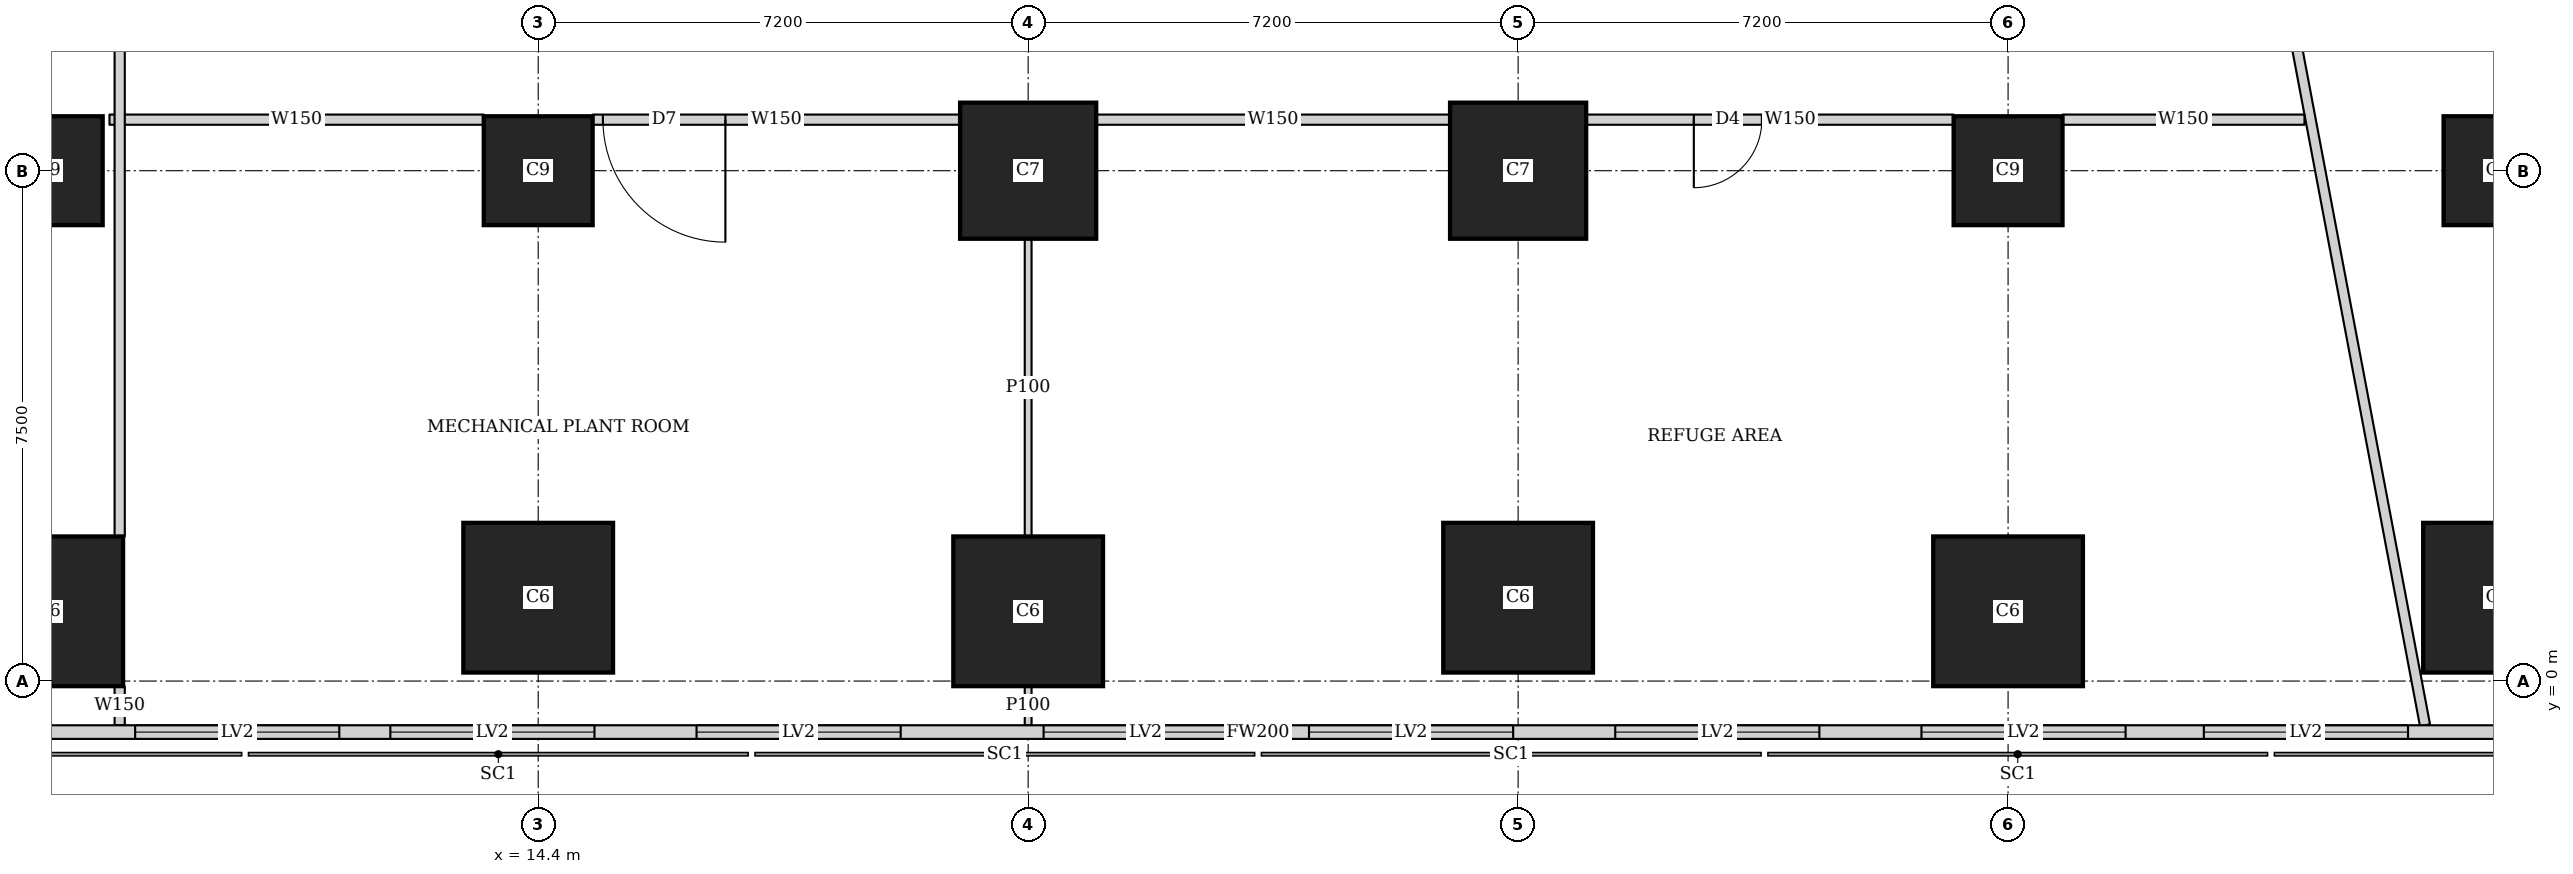
"""IFC4 building model, lengths in metres.
Left out: names, types, materials, properties, quantities, classifications, styles, units other than length and angle.
Written with IfcOpenShell. Run it as: python <this file> out.ifc"""

import sys

from ifc_helpers import new_model, si_unit, direction, frame, frame_2d, origin, origin_2d, place, context, subcontext, project, spatial, rectangle, extrude, element, fill, save


model = new_model("IFC4")
c1 = context("Model", 3, precision=1e-05, world=origin(), true_north=direction((0.0, 1.0)))
c2 = subcontext(c1, "Body", "Model", "MODEL_VIEW")
j1 = project(units=[si_unit("LENGTHUNIT", "METRE"), si_unit("PLANEANGLEUNIT", "RADIAN")], contexts=[c1])
p1 = place(None, origin())
s1 = spatial("IfcSite", under=j1, at=p1, CompositionType="ELEMENT")
p2 = place(p1, origin())
s2 = spatial("IfcBuilding", under=s1, at=p2, CompositionType="ELEMENT")
p3 = place(p2, frame((0.0, 0.0, 130.4)))
s3 = spatial("IfcBuildingStorey", under=s2, at=p3, CompositionType="ELEMENT", Elevation=130.4)
for number, where, z_axis, x_axis in (
    (1, (7.2, 1.025, 0.0), (0.0, 0.0, 1.0), (1.0, 0.0, 0.0)),
    (2, (14.4, 1.225, 0.0), (0.0, 0.0, 1.0), (1.0, 0.0, 0.0)),
    (3, (21.6, 1.025, 0.0), (0.0, 0.0, 1.0), (1.0, 0.0, 0.0)),
    (4, (28.8, 1.225, 0.0), (0.0, 0.0, 1.0), (1.0, 0.0, 0.0)),
    (5, (36.0, 1.025, 0.0), (0.0, 0.0, 1.0), (1.0, 0.0, 0.0)),
    (6, (43.2, 1.225, 0.0), (0.0, 0.0, 1.0), (1.0, 0.0, 0.0)),
):
    element("IfcColumn", number, at=place(p3, frame(where, z_axis=z_axis, x_axis=x_axis)), inside=s3, PredefinedType="COLUMN", context=c2, shape_type="SweptSolid", body=[
        extrude(rectangle(XDim=2.2, YDim=2.2, at=origin_2d()), origin(), (0.0, 0.0, 1.0), 5.4),
    ])
for number, where, z_axis, x_axis in (
    (7, (7.2, 7.5, 0.0), (0.0, 0.0, 1.0), (1.0, 0.0, 0.0)),
    (8, (14.4, 7.5, 0.0), (0.0, 0.0, 1.0), (1.0, 0.0, 0.0)),
):
    element("IfcColumn", number, at=place(p3, frame(where, z_axis=z_axis, x_axis=x_axis)), inside=s3, PredefinedType="COLUMN", context=c2, shape_type="SweptSolid", body=[
        extrude(rectangle(XDim=1.6, YDim=1.6, at=origin_2d()), origin(), (0.0, 0.0, 1.0), 5.4),
    ])
for number, where, z_axis, x_axis in (
    (9, (21.6, 7.5, 0.0), (0.0, 0.0, 1.0), (1.0, 0.0, 0.0)),
    (10, (28.8, 7.5, 0.0), (0.0, 0.0, 1.0), (1.0, 0.0, 0.0)),
):
    element("IfcColumn", number, at=place(p3, frame(where, z_axis=z_axis, x_axis=x_axis)), inside=s3, PredefinedType="COLUMN", context=c2, shape_type="SweptSolid", body=[
        extrude(rectangle(XDim=2.0, YDim=2.0, at=origin_2d()), origin(), (0.0, 0.0, 1.0), 5.4),
    ])
for number, where, z_axis, x_axis in (
    (11, (36.0, 7.5, 0.0), (0.0, 0.0, 1.0), (1.0, 0.0, 0.0)),
    (12, (43.2, 7.5, 0.0), (0.0, 0.0, 1.0), (1.0, 0.0, 0.0)),
):
    element("IfcColumn", number, at=place(p3, frame(where, z_axis=z_axis, x_axis=x_axis)), inside=s3, PredefinedType="COLUMN", context=c2, shape_type="SweptSolid", body=[
        extrude(rectangle(XDim=1.6, YDim=1.6, at=origin_2d()), origin(), (0.0, 0.0, 1.0), 5.4),
    ])
p4 = place(p3, frame((2.163, -0.75, 0.0), z_axis=(0.0, 0.0, 1.0), x_axis=(1.0, 0.0, 0.0)))
e13 = element("IfcWall", 13, at=p4, inside=s3, PredefinedType="SOLIDWALL", context=c2, shape_type="SweptSolid", body=[
    extrude(rectangle(XDim=45.628, YDim=0.2, at=frame_2d((22.814, 0.0))), origin(), (0.0, 0.0, 1.0), 5.15),
])
p5 = place(p4, frame((1.064, 0.0, 0.6)))
e14 = element("IfcOpeningElement", 14, at=p5, cuts=e13, PredefinedType="OPENING", context=c2, shape_type="SweptSolid", body=[
    extrude(rectangle(XDim=3.0, YDim=2.7, at=frame_2d((1.5, 1.35))), frame((0.0, 0.11, 0.0), z_axis=(0.0, -1.0, 0.0), x_axis=(1.0, 0.0, 0.0)), (0.0, 0.0, 1.0), 0.22),
])
p6 = place(p4, frame((6.314, 0.0, 0.6)))
e15 = element("IfcOpeningElement", 15, at=p6, cuts=e13, PredefinedType="OPENING", context=c2, shape_type="SweptSolid", body=[
    extrude(rectangle(XDim=3.0, YDim=2.7, at=frame_2d((1.5, 1.35))), frame((0.0, 0.11, 0.0), z_axis=(0.0, -1.0, 0.0), x_axis=(1.0, 0.0, 0.0)), (0.0, 0.0, 1.0), 0.22),
])
p7 = place(p4, frame((10.064, 0.0, 0.6)))
e16 = element("IfcOpeningElement", 16, at=p7, cuts=e13, PredefinedType="OPENING", context=c2, shape_type="SweptSolid", body=[
    extrude(rectangle(XDim=3.0, YDim=2.7, at=frame_2d((1.5, 1.35))), frame((0.0, 0.11, 0.0), z_axis=(0.0, -1.0, 0.0), x_axis=(1.0, 0.0, 0.0)), (0.0, 0.0, 1.0), 0.22),
])
p8 = place(p4, frame((14.564, 0.0, 0.6)))
e17 = element("IfcOpeningElement", 17, at=p8, cuts=e13, PredefinedType="OPENING", context=c2, shape_type="SweptSolid", body=[
    extrude(rectangle(XDim=3.0, YDim=2.7, at=frame_2d((1.5, 1.35))), frame((0.0, 0.11, 0.0), z_axis=(0.0, -1.0, 0.0), x_axis=(1.0, 0.0, 0.0)), (0.0, 0.0, 1.0), 0.22),
])
p9 = place(p4, frame((19.664, 0.0, 0.6)))
e18 = element("IfcOpeningElement", 18, at=p9, cuts=e13, PredefinedType="OPENING", context=c2, shape_type="SweptSolid", body=[
    extrude(rectangle(XDim=3.0, YDim=2.7, at=frame_2d((1.5, 1.35))), frame((0.0, 0.11, 0.0), z_axis=(0.0, -1.0, 0.0), x_axis=(1.0, 0.0, 0.0)), (0.0, 0.0, 1.0), 0.22),
])
p10 = place(p4, frame((23.564, 0.0, 0.6)))
e19 = element("IfcOpeningElement", 19, at=p10, cuts=e13, PredefinedType="OPENING", context=c2, shape_type="SweptSolid", body=[
    extrude(rectangle(XDim=3.0, YDim=2.7, at=frame_2d((1.5, 1.35))), frame((0.0, 0.11, 0.0), z_axis=(0.0, -1.0, 0.0), x_axis=(1.0, 0.0, 0.0)), (0.0, 0.0, 1.0), 0.22),
])
p11 = place(p4, frame((28.064, 0.0, 0.6)))
e20 = element("IfcOpeningElement", 20, at=p11, cuts=e13, PredefinedType="OPENING", context=c2, shape_type="SweptSolid", body=[
    extrude(rectangle(XDim=3.0, YDim=2.7, at=frame_2d((1.5, 1.35))), frame((0.0, 0.11, 0.0), z_axis=(0.0, -1.0, 0.0), x_axis=(1.0, 0.0, 0.0)), (0.0, 0.0, 1.0), 0.22),
])
p12 = place(p4, frame((32.564, 0.0, 0.6)))
e21 = element("IfcOpeningElement", 21, at=p12, cuts=e13, PredefinedType="OPENING", context=c2, shape_type="SweptSolid", body=[
    extrude(rectangle(XDim=3.0, YDim=2.7, at=frame_2d((1.5, 1.35))), frame((0.0, 0.11, 0.0), z_axis=(0.0, -1.0, 0.0), x_axis=(1.0, 0.0, 0.0)), (0.0, 0.0, 1.0), 0.22),
])
p13 = place(p4, frame((36.714, 0.0, 0.6)))
e22 = element("IfcOpeningElement", 22, at=p13, cuts=e13, PredefinedType="OPENING", context=c2, shape_type="SweptSolid", body=[
    extrude(rectangle(XDim=3.0, YDim=2.7, at=frame_2d((1.5, 1.35))), frame((0.0, 0.11, 0.0), z_axis=(0.0, -1.0, 0.0), x_axis=(1.0, 0.0, 0.0)), (0.0, 0.0, 1.0), 0.22),
])
p14 = place(p4, frame((41.564, 0.0, 0.6)))
e23 = element("IfcOpeningElement", 23, at=p14, cuts=e13, PredefinedType="OPENING", context=c2, shape_type="SweptSolid", body=[
    extrude(rectangle(XDim=3.0, YDim=2.7, at=frame_2d((1.5, 1.35))), frame((0.0, 0.11, 0.0), z_axis=(0.0, -1.0, 0.0), x_axis=(1.0, 0.0, 0.0)), (0.0, 0.0, 1.0), 0.22),
])
p15 = place(p3, frame((50.653, 2.703, 0.0), z_axis=(0.0, 0.0, 1.0), x_axis=(-0.185612026696, 0.982623109613, 0.0)))
e24 = element("IfcWall", 24, at=p15, inside=s3, PredefinedType="SOLIDWALL", context=c2, shape_type="SweptSolid", body=[
    extrude(rectangle(XDim=41.393, YDim=0.2, at=frame_2d((20.697, 0.0))), origin(), (0.0, 0.0, 1.0), 5.15),
])
p16 = place(p15, frame((1.197, 0.0, 0.6)))
e25 = element("IfcOpeningElement", 25, at=p16, cuts=e24, PredefinedType="OPENING", context=c2, shape_type="SweptSolid", body=[
    extrude(rectangle(XDim=3.0, YDim=2.7, at=frame_2d((1.5, 1.35))), frame((0.0, 0.11, 0.0), z_axis=(0.0, -1.0, 0.0), x_axis=(1.0, 0.0, 0.0)), (0.0, 0.0, 1.0), 0.22),
])
p17 = place(p15, frame((5.697, 0.0, 0.6)))
e26 = element("IfcOpeningElement", 26, at=p17, cuts=e24, PredefinedType="OPENING", context=c2, shape_type="SweptSolid", body=[
    extrude(rectangle(XDim=3.0, YDim=2.7, at=frame_2d((1.5, 1.35))), frame((0.0, 0.11, 0.0), z_axis=(0.0, -1.0, 0.0), x_axis=(1.0, 0.0, 0.0)), (0.0, 0.0, 1.0), 0.22),
])
p18 = place(p15, frame((10.197, 0.0, 0.6)))
e27 = element("IfcOpeningElement", 27, at=p18, cuts=e24, PredefinedType="OPENING", context=c2, shape_type="SweptSolid", body=[
    extrude(rectangle(XDim=3.0, YDim=2.7, at=frame_2d((1.5, 1.35))), frame((0.0, 0.11, 0.0), z_axis=(0.0, -1.0, 0.0), x_axis=(1.0, 0.0, 0.0)), (0.0, 0.0, 1.0), 0.22),
])
p19 = place(p15, frame((14.697, 0.0, 0.6)))
e28 = element("IfcOpeningElement", 28, at=p19, cuts=e24, PredefinedType="OPENING", context=c2, shape_type="SweptSolid", body=[
    extrude(rectangle(XDim=3.0, YDim=2.7, at=frame_2d((1.5, 1.35))), frame((0.0, 0.11, 0.0), z_axis=(0.0, -1.0, 0.0), x_axis=(1.0, 0.0, 0.0)), (0.0, 0.0, 1.0), 0.22),
])
p20 = place(p15, frame((19.197, 0.0, 0.6)))
e29 = element("IfcOpeningElement", 29, at=p20, cuts=e24, PredefinedType="OPENING", context=c2, shape_type="SweptSolid", body=[
    extrude(rectangle(XDim=3.0, YDim=2.7, at=frame_2d((1.5, 1.35))), frame((0.0, 0.11, 0.0), z_axis=(0.0, -1.0, 0.0), x_axis=(1.0, 0.0, 0.0)), (0.0, 0.0, 1.0), 0.22),
])
p21 = place(p15, frame((23.697, 0.0, 0.6)))
e30 = element("IfcOpeningElement", 30, at=p21, cuts=e24, PredefinedType="OPENING", context=c2, shape_type="SweptSolid", body=[
    extrude(rectangle(XDim=3.0, YDim=2.7, at=frame_2d((1.5, 1.35))), frame((0.0, 0.11, 0.0), z_axis=(0.0, -1.0, 0.0), x_axis=(1.0, 0.0, 0.0)), (0.0, 0.0, 1.0), 0.22),
])
p22 = place(p15, frame((28.197, 0.0, 0.6)))
e31 = element("IfcOpeningElement", 31, at=p22, cuts=e24, PredefinedType="OPENING", context=c2, shape_type="SweptSolid", body=[
    extrude(rectangle(XDim=3.0, YDim=2.7, at=frame_2d((1.5, 1.35))), frame((0.0, 0.11, 0.0), z_axis=(0.0, -1.0, 0.0), x_axis=(1.0, 0.0, 0.0)), (0.0, 0.0, 1.0), 0.22),
])
p23 = place(p15, frame((32.697, 0.0, 0.6)))
e32 = element("IfcOpeningElement", 32, at=p23, cuts=e24, PredefinedType="OPENING", context=c2, shape_type="SweptSolid", body=[
    extrude(rectangle(XDim=3.0, YDim=2.7, at=frame_2d((1.5, 1.35))), frame((0.0, 0.11, 0.0), z_axis=(0.0, -1.0, 0.0), x_axis=(1.0, 0.0, 0.0)), (0.0, 0.0, 1.0), 0.22),
])
p24 = place(p15, frame((37.197, 0.0, 0.6)))
e33 = element("IfcOpeningElement", 33, at=p24, cuts=e24, PredefinedType="OPENING", context=c2, shape_type="SweptSolid", body=[
    extrude(rectangle(XDim=3.0, YDim=2.7, at=frame_2d((1.5, 1.35))), frame((0.0, 0.11, 0.0), z_axis=(0.0, -1.0, 0.0), x_axis=(1.0, 0.0, 0.0)), (0.0, 0.0, 1.0), 0.22),
])
p25 = place(p3, frame((8.25, -0.65, 0.0), z_axis=(0.0, 0.0, 1.0), x_axis=(0.0, 1.0, 0.0)))
e34 = element("IfcWall", 34, at=p25, inside=s3, PredefinedType="SOLIDWALL", context=c2, shape_type="SweptSolid", body=[
    extrude(rectangle(XDim=0.574, YDim=0.15, at=frame_2d((0.287, 0.0))), origin(), (0.0, 0.0, 1.0), 5.15),
])
p26 = place(p3, frame((8.25, 2.126, 0.0), z_axis=(0.0, 0.0, 1.0), x_axis=(0.0, 1.0, 0.0)))
e35 = element("IfcWall", 35, at=p26, inside=s3, PredefinedType="SOLIDWALL", context=c2, shape_type="SweptSolid", body=[
    extrude(rectangle(XDim=40.773, YDim=0.15, at=frame_2d((20.386, 0.0))), origin(), (0.0, 0.0, 1.0), 3.55),
])
p27 = place(p26, frame((18.55, 0.0, 0.0)))
e36 = element("IfcOpeningElement", 36, at=p27, cuts=e35, PredefinedType="OPENING", context=c2, shape_type="SweptSolid", body=[
    extrude(rectangle(XDim=1.0, YDim=2.1, at=frame_2d((0.5, 1.05))), frame((0.0, 0.085, 0.0), z_axis=(0.0, -1.0, 0.0), x_axis=(1.0, 0.0, 0.0)), (0.0, 0.0, 1.0), 0.17),
])
p28 = place(p3, frame((40.356, 8.25, 0.0), z_axis=(0.0, 0.0, 1.0), x_axis=(-1.0, 0.0, 0.0)))
e37 = element("IfcWall", 37, at=p28, inside=s3, PredefinedType="SOLIDWALL", context=c2, shape_type="SweptSolid", body=[
    extrude(rectangle(XDim=3.555, YDim=0.15, at=frame_2d((1.777, 0.0))), origin(), (0.0, 0.0, 1.0), 3.55),
])
p29 = place(p3, frame((35.199, 8.25, 0.0), z_axis=(0.0, 0.0, 1.0), x_axis=(-1.0, 0.0, 0.0)))
e38 = element("IfcWall", 38, at=p29, inside=s3, PredefinedType="SOLIDWALL", context=c2, shape_type="SweptSolid", body=[
    extrude(rectangle(XDim=5.398, YDim=0.15, at=frame_2d((2.699, 0.0))), origin(), (0.0, 0.0, 1.0), 3.15),
])
p30 = place(p29, frame((2.817, 0.0, 0.0)))
e39 = element("IfcOpeningElement", 39, at=p30, cuts=e38, PredefinedType="OPENING", context=c2, shape_type="SweptSolid", body=[
    extrude(rectangle(XDim=1.0, YDim=2.1, at=frame_2d((0.5, 1.05))), frame((0.0, 0.085, 0.0), z_axis=(0.0, -1.0, 0.0), x_axis=(1.0, 0.0, 0.0)), (0.0, 0.0, 1.0), 0.17),
])
p31 = place(p3, frame((27.799, 8.25, 0.0), z_axis=(0.0, 0.0, 1.0), x_axis=(-1.0, 0.0, 0.0)))
e40 = element("IfcWall", 40, at=p31, inside=s3, PredefinedType="SOLIDWALL", context=c2, shape_type="SweptSolid", body=[
    extrude(rectangle(XDim=5.198, YDim=0.15, at=frame_2d((2.599, 0.0))), origin(), (0.0, 0.0, 1.0), 3.15),
])
p32 = place(p3, frame((20.599, 8.25, 0.0), z_axis=(0.0, 0.0, 1.0), x_axis=(-1.0, 0.0, 0.0)))
e41 = element("IfcWall", 41, at=p32, inside=s3, PredefinedType="SOLIDWALL", context=c2, shape_type="SweptSolid", body=[
    extrude(rectangle(XDim=5.398, YDim=0.15, at=frame_2d((2.699, 0.0))), origin(), (0.0, 0.0, 1.0), 3.15),
])
p33 = place(p32, frame((3.448, 0.0, 0.0)))
e42 = element("IfcOpeningElement", 42, at=p33, cuts=e41, PredefinedType="OPENING", context=c2, shape_type="SweptSolid", body=[
    extrude(rectangle(XDim=1.8, YDim=2.4, at=frame_2d((0.9, 1.2))), frame((0.0, 0.085, 0.0), z_axis=(0.0, -1.0, 0.0), x_axis=(1.0, 0.0, 0.0)), (0.0, 0.0, 1.0), 0.17),
])
p34 = place(p3, frame((13.599, 8.25, 0.0), z_axis=(0.0, 0.0, 1.0), x_axis=(-1.0, 0.0, 0.0)))
e43 = element("IfcWall", 43, at=p34, inside=s3, PredefinedType="SOLIDWALL", context=c2, shape_type="SweptSolid", body=[
    extrude(rectangle(XDim=5.499, YDim=0.15, at=frame_2d((2.75, 0.0))), origin(), (0.0, 0.0, 1.0), 3.55),
])
p35 = place(p3, frame((33.382, 45.65, 0.0), z_axis=(0.0, 0.0, 1.0), x_axis=(0.185593544777, -0.982626600565, 0.0)))
e44 = element("IfcWall", 44, at=p35, inside=s3, PredefinedType="SOLIDWALL", context=c2, shape_type="SweptSolid", body=[
    extrude(rectangle(XDim=47.118, YDim=0.15, at=frame_2d((23.559, 0.0))), origin(), (0.0, 0.0, 1.0), 3.35),
])
p36 = place(p35, frame((24.35, 0.0, 0.0)))
e45 = element("IfcOpeningElement", 45, at=p36, cuts=e44, PredefinedType="OPENING", context=c2, shape_type="SweptSolid", body=[
    extrude(rectangle(XDim=1.0, YDim=2.1, at=frame_2d((0.5, 1.05))), frame((0.0, 0.085, 0.0), z_axis=(0.0, -1.0, 0.0), x_axis=(1.0, 0.0, 0.0)), (0.0, 0.0, 1.0), 0.17),
])
p37 = place(p3, frame((21.6, -0.65, 0.0), z_axis=(0.0, 0.0, 1.0), x_axis=(0.0, 1.0, 0.0)))
e46 = element("IfcWall", 46, at=p37, inside=s3, PredefinedType="PARTITIONING", context=c2, shape_type="SweptSolid", body=[
    extrude(rectangle(XDim=0.574, YDim=0.1, at=frame_2d((0.287, 0.0))), origin(), (0.0, 0.0, 1.0), 5.15),
])
p38 = place(p3, frame((21.6, 2.126, 0.0), z_axis=(0.0, 0.0, 1.0), x_axis=(0.0, 1.0, 0.0)))
e47 = element("IfcWall", 47, at=p38, inside=s3, PredefinedType="PARTITIONING", context=c2, shape_type="SweptSolid", body=[
    extrude(rectangle(XDim=4.373, YDim=0.1, at=frame_2d((2.187, 0.0))), origin(), (0.0, 0.0, 1.0), 3.55),
])
p39 = place(p6, origin())
e48 = element("IfcWindow", 48, at=p39, inside=s3, PartitioningType="SINGLE_PANEL", PredefinedType="USERDEFINED", context=c2, shape_type="SweptSolid", body=[
    extrude(rectangle(XDim=3.0, YDim=2.7, at=frame_2d((1.5, 1.35))), frame((0.0, 0.03, 0.0), z_axis=(0.0, -1.0, 0.0), x_axis=(1.0, 0.0, 0.0)), (0.0, 0.0, 1.0), 0.06),
])
fill(e15, e48)
p40 = place(p7, origin())
e49 = element("IfcWindow", 49, at=p40, inside=s3, PartitioningType="SINGLE_PANEL", PredefinedType="USERDEFINED", context=c2, shape_type="SweptSolid", body=[
    extrude(rectangle(XDim=3.0, YDim=2.7, at=frame_2d((1.5, 1.35))), frame((0.0, 0.03, 0.0), z_axis=(0.0, -1.0, 0.0), x_axis=(1.0, 0.0, 0.0)), (0.0, 0.0, 1.0), 0.06),
])
fill(e16, e49)
p41 = place(p8, origin())
e50 = element("IfcWindow", 50, at=p41, inside=s3, PartitioningType="SINGLE_PANEL", PredefinedType="USERDEFINED", context=c2, shape_type="SweptSolid", body=[
    extrude(rectangle(XDim=3.0, YDim=2.7, at=frame_2d((1.5, 1.35))), frame((0.0, 0.03, 0.0), z_axis=(0.0, -1.0, 0.0), x_axis=(1.0, 0.0, 0.0)), (0.0, 0.0, 1.0), 0.06),
])
fill(e17, e50)
p42 = place(p9, origin())
e51 = element("IfcWindow", 51, at=p42, inside=s3, PartitioningType="SINGLE_PANEL", PredefinedType="USERDEFINED", context=c2, shape_type="SweptSolid", body=[
    extrude(rectangle(XDim=3.0, YDim=2.7, at=frame_2d((1.5, 1.35))), frame((0.0, 0.03, 0.0), z_axis=(0.0, -1.0, 0.0), x_axis=(1.0, 0.0, 0.0)), (0.0, 0.0, 1.0), 0.06),
])
fill(e18, e51)
p43 = place(p10, origin())
e52 = element("IfcWindow", 52, at=p43, inside=s3, PartitioningType="SINGLE_PANEL", PredefinedType="USERDEFINED", context=c2, shape_type="SweptSolid", body=[
    extrude(rectangle(XDim=3.0, YDim=2.7, at=frame_2d((1.5, 1.35))), frame((0.0, 0.03, 0.0), z_axis=(0.0, -1.0, 0.0), x_axis=(1.0, 0.0, 0.0)), (0.0, 0.0, 1.0), 0.06),
])
fill(e19, e52)
p44 = place(p11, origin())
e53 = element("IfcWindow", 53, at=p44, inside=s3, PartitioningType="SINGLE_PANEL", PredefinedType="USERDEFINED", context=c2, shape_type="SweptSolid", body=[
    extrude(rectangle(XDim=3.0, YDim=2.7, at=frame_2d((1.5, 1.35))), frame((0.0, 0.03, 0.0), z_axis=(0.0, -1.0, 0.0), x_axis=(1.0, 0.0, 0.0)), (0.0, 0.0, 1.0), 0.06),
])
fill(e20, e53)
p45 = place(p12, origin())
e54 = element("IfcWindow", 54, at=p45, inside=s3, PartitioningType="SINGLE_PANEL", PredefinedType="USERDEFINED", context=c2, shape_type="SweptSolid", body=[
    extrude(rectangle(XDim=3.0, YDim=2.7, at=frame_2d((1.5, 1.35))), frame((0.0, 0.03, 0.0), z_axis=(0.0, -1.0, 0.0), x_axis=(1.0, 0.0, 0.0)), (0.0, 0.0, 1.0), 0.06),
])
fill(e21, e54)
p46 = place(p13, origin())
e55 = element("IfcWindow", 55, at=p46, inside=s3, PartitioningType="SINGLE_PANEL", PredefinedType="USERDEFINED", context=c2, shape_type="SweptSolid", body=[
    extrude(rectangle(XDim=3.0, YDim=2.7, at=frame_2d((1.5, 1.35))), frame((0.0, 0.03, 0.0), z_axis=(0.0, -1.0, 0.0), x_axis=(1.0, 0.0, 0.0)), (0.0, 0.0, 1.0), 0.06),
])
fill(e22, e55)
p47 = place(p33, origin())
e56 = element("IfcDoor", 56, at=p47, inside=s3, OperationType="DOUBLE_DOOR_SINGLE_SWING", PredefinedType="DOOR", context=c2, shape_type="SweptSolid", body=[
    extrude(rectangle(XDim=1.8, YDim=2.4, at=frame_2d((0.9, 1.2))), frame((0.0, 0.025, 0.0), z_axis=(0.0, -1.0, 0.0), x_axis=(1.0, 0.0, 0.0)), (0.0, 0.0, 1.0), 0.05),
])
fill(e42, e56)
p48 = place(p30, origin())
e57 = element("IfcDoor", 57, at=p48, inside=s3, OperationType="SINGLE_SWING_RIGHT", PredefinedType="DOOR", context=c2, shape_type="SweptSolid", body=[
    extrude(rectangle(XDim=1.0, YDim=2.1, at=frame_2d((0.5, 1.05))), frame((0.0, 0.025, 0.0), z_axis=(0.0, -1.0, 0.0), x_axis=(1.0, 0.0, 0.0)), (0.0, 0.0, 1.0), 0.05),
])
fill(e39, e57)
save(model, sys.argv[1])
